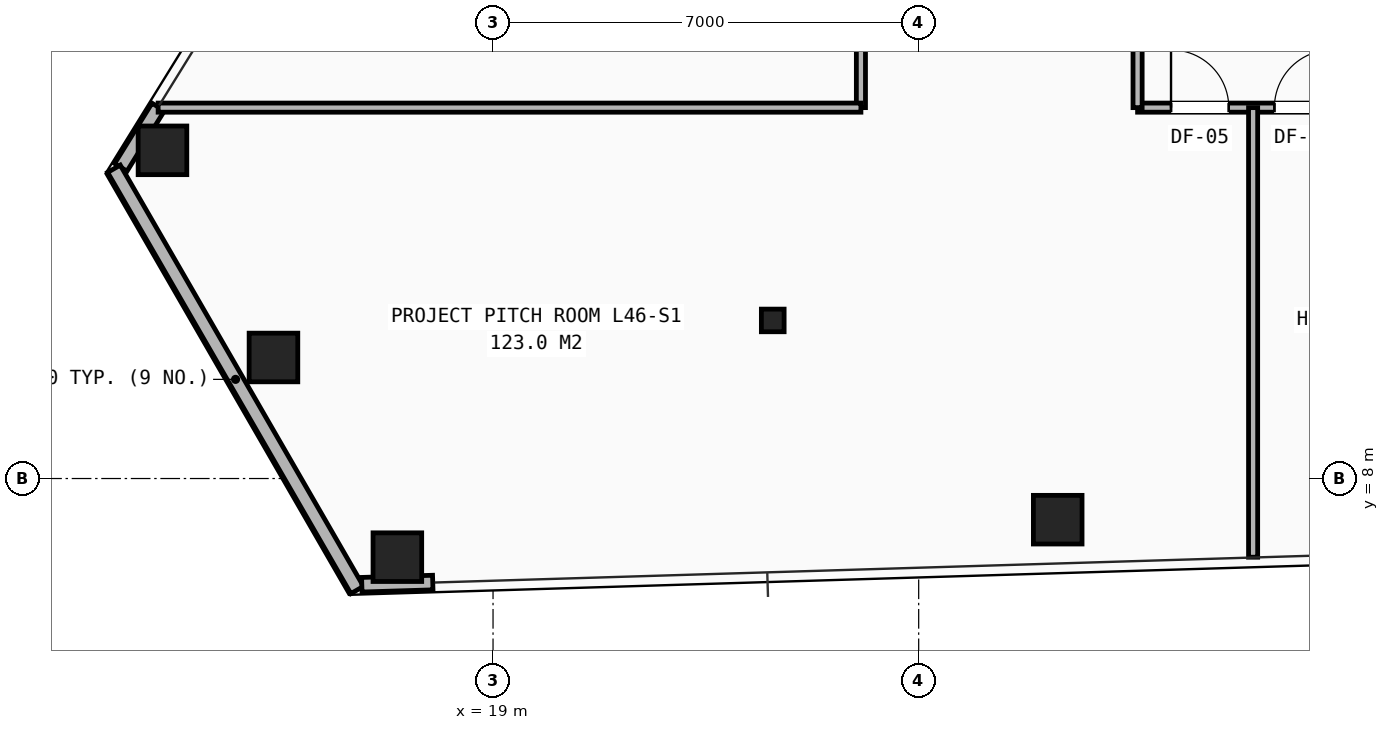
"""IFC4 building model, lengths in metres.
Left out: names, types, materials, properties, quantities, classifications, styles, units other than length and angle.
Written with IfcOpenShell. Run it as: python <this file> out.ifc"""

import sys

from ifc_helpers import new_model, si_unit, direction, frame, frame_2d, origin, origin_2d, place, context, subcontext, project, spatial, rectangle, hollow_rectangle, i_section, extrude, element, fill, save


model = new_model("IFC4")
c1 = context("Model", 3, precision=1e-05, world=origin(), true_north=direction((0.0, 1.0)))
c2 = subcontext(c1, "Body", "Model", "MODEL_VIEW")
j1 = project(units=[si_unit("LENGTHUNIT", "METRE"), si_unit("PLANEANGLEUNIT", "RADIAN")], contexts=[c1])
p1 = place(None, origin())
s1 = spatial("IfcSite", under=j1, at=p1, CompositionType="ELEMENT")
p2 = place(p1, origin())
s2 = spatial("IfcBuilding", under=s1, at=p2, CompositionType="ELEMENT")
p3 = place(p2, frame((0.0, 0.0, 162.0)))
s3 = spatial("IfcBuildingStorey", under=s2, at=p3, CompositionType="ELEMENT", Elevation=162.0)
p4 = place(p3, frame((23.6, 10.6, 0.0), z_axis=(0.0, 0.0, 1.0), x_axis=(1.0, 0.0, 0.0)))
e1 = element("IfcColumn", 1, at=p4, inside=s3, PredefinedType="COLUMN", context=c2, shape_type="SweptSolid", body=[
    extrude(i_section(OverallWidth=0.374, OverallDepth=0.372, WebThickness=0.016, FlangeThickness=0.026, at=origin_2d()), origin(), (0.0, 0.0, 1.0), 3.45),
])
for number, where, z_axis, x_axis in (
    (2, (13.564, 13.398, 0.0), (0.0, 0.0, 1.0), (1.0, 0.0, 0.0)),
    (3, (15.389, 9.991, 0.0), (0.0, 0.0, 1.0), (1.0, 0.0, 0.0)),
    (4, (17.427, 6.707, 0.0), (0.0, 0.0, 1.0), (1.0, 0.0, 0.0)),
    (5, (28.287, 7.323, 0.0), (0.0, 0.0, 1.0), (1.0, 0.0, 0.0)),
):
    element("IfcColumn", number, at=place(p3, frame(where, z_axis=z_axis, x_axis=x_axis)), inside=s3, PredefinedType="COLUMN", context=c2, shape_type="SweptSolid", body=[
        extrude(hollow_rectangle(XDim=0.8, YDim=0.8, WallThickness=0.055, at=origin_2d()), origin(), (0.0, 0.0, 1.0), 3.45),
    ])
p5 = place(p3, frame((13.493, 14.111, 0.0), z_axis=(0.0, 0.0, 1.0), x_axis=(-0.526196207656, -0.850363187731, 0.0)))
e6 = element("IfcWall", 6, at=p5, inside=s3, PredefinedType="SHEAR", context=c2, shape_type="SweptSolid", body=[
    extrude(rectangle(XDim=1.167, YDim=0.24, at=frame_2d((0.583, 0.0))), origin(), (0.0, 0.0, 1.0), 2.583),
])
p6 = place(p3, frame((16.765, 6.167, 0.0), z_axis=(0.0, 0.0, 1.0), x_axis=(-0.499985734379, 0.866033639888, 0.0)))
e7 = element("IfcWall", 7, at=p6, inside=s3, PredefinedType="SHEAR", context=c2, shape_type="SweptSolid", body=[
    extrude(rectangle(XDim=8.0, YDim=0.24, at=frame_2d((4.0, 0.0))), origin(), (0.0, 0.0, 1.0), 2.583),
])
p7 = place(p3, frame((16.842, 6.253, 0.0), z_axis=(0.0, 0.0, 1.0), x_axis=(0.999533860209, 0.030529695312, 0.0)))
e8 = element("IfcWall", 8, at=p7, inside=s3, PredefinedType="SHEAR", context=c2, shape_type="SweptSolid", body=[
    extrude(rectangle(XDim=1.167, YDim=0.24, at=frame_2d((0.584, 0.0))), origin(), (0.0, 0.0, 1.0), 2.583),
])
p8 = place(p3, frame((29.6, 14.1, 0.0), z_axis=(0.0, 0.0, 1.0), x_axis=(1.0, 0.0, 0.0)))
e9 = element("IfcWall", 9, at=p8, inside=s3, PredefinedType="PARTITIONING", context=c2, shape_type="SweptSolid", body=[
    extrude(rectangle(XDim=18.6, YDim=0.15, at=frame_2d((9.3, 0.0))), origin(), (0.0, 0.0, 1.0), 2.252),
])
p9 = place(p8, frame((0.55, 0.0, 0.0)))
e10 = element("IfcOpeningElement", 10, at=p9, cuts=e9, PredefinedType="OPENING", context=c2, shape_type="SweptSolid", body=[
    extrude(rectangle(XDim=0.95, YDim=2.1, at=frame_2d((0.475, 1.05))), frame((0.0, 0.085, 0.0), z_axis=(0.0, -1.0, 0.0), x_axis=(1.0, 0.0, 0.0)), (0.0, 0.0, 1.0), 0.17),
])
p10 = place(p8, frame((2.25, 0.0, 0.0)))
e11 = element("IfcOpeningElement", 11, at=p10, cuts=e9, PredefinedType="OPENING", context=c2, shape_type="SweptSolid", body=[
    extrude(rectangle(XDim=0.95, YDim=2.1, at=frame_2d((0.475, 1.05))), frame((0.0, 0.085, 0.0), z_axis=(0.0, -1.0, 0.0), x_axis=(1.0, 0.0, 0.0)), (0.0, 0.0, 1.0), 0.17),
])
p11 = place(p8, frame((6.55, 0.0, 0.0)))
e12 = element("IfcOpeningElement", 12, at=p11, cuts=e9, PredefinedType="OPENING", context=c2, shape_type="SweptSolid", body=[
    extrude(rectangle(XDim=0.95, YDim=2.1, at=frame_2d((0.475, 1.05))), frame((0.0, 0.085, 0.0), z_axis=(0.0, -1.0, 0.0), x_axis=(1.0, 0.0, 0.0)), (0.0, 0.0, 1.0), 0.17),
])
p12 = place(p8, frame((10.75, 0.0, 0.0)))
e13 = element("IfcOpeningElement", 13, at=p12, cuts=e9, PredefinedType="OPENING", context=c2, shape_type="SweptSolid", body=[
    extrude(rectangle(XDim=0.95, YDim=2.1, at=frame_2d((0.475, 1.05))), frame((0.0, 0.085, 0.0), z_axis=(0.0, -1.0, 0.0), x_axis=(1.0, 0.0, 0.0)), (0.0, 0.0, 1.0), 0.17),
])
p13 = place(p8, frame((14.95, 0.0, 0.0)))
e14 = element("IfcOpeningElement", 14, at=p13, cuts=e9, PredefinedType="OPENING", context=c2, shape_type="SweptSolid", body=[
    extrude(rectangle(XDim=0.95, YDim=2.1, at=frame_2d((0.475, 1.05))), frame((0.0, 0.085, 0.0), z_axis=(0.0, -1.0, 0.0), x_axis=(1.0, 0.0, 0.0)), (0.0, 0.0, 1.0), 0.17),
])
p14 = place(p3, frame((29.6, 14.1, 0.0), z_axis=(0.0, 0.0, 1.0), x_axis=(0.0, 1.0, 0.0)))
e15 = element("IfcWall", 15, at=p14, inside=s3, PredefinedType="PARTITIONING", context=c2, shape_type="SweptSolid", body=[
    extrude(rectangle(XDim=8.7, YDim=0.15, at=frame_2d((4.35, 0.0))), origin(), (0.0, 0.0, 1.0), 3.21),
])
p15 = place(p14, frame((2.65, 0.0, 0.0)))
e16 = element("IfcOpeningElement", 16, at=p15, cuts=e15, PredefinedType="OPENING", context=c2, shape_type="SweptSolid", body=[
    extrude(rectangle(XDim=0.85, YDim=2.05, at=frame_2d((0.425, 1.025))), frame((0.0, 0.085, 0.0), z_axis=(0.0, -1.0, 0.0), x_axis=(1.0, 0.0, 0.0)), (0.0, 0.0, 1.0), 0.17),
])
p16 = place(p14, frame((4.75, 0.0, 0.0)))
e17 = element("IfcOpeningElement", 17, at=p16, cuts=e15, PredefinedType="OPENING", context=c2, shape_type="SweptSolid", body=[
    extrude(rectangle(XDim=0.85, YDim=2.05, at=frame_2d((0.425, 1.025))), frame((0.0, 0.085, 0.0), z_axis=(0.0, -1.0, 0.0), x_axis=(1.0, 0.0, 0.0)), (0.0, 0.0, 1.0), 0.17),
])
p17 = place(p14, frame((6.85, 0.0, 0.0)))
e18 = element("IfcOpeningElement", 18, at=p17, cuts=e15, PredefinedType="OPENING", context=c2, shape_type="SweptSolid", body=[
    extrude(rectangle(XDim=0.85, YDim=2.05, at=frame_2d((0.425, 1.025))), frame((0.0, 0.085, 0.0), z_axis=(0.0, -1.0, 0.0), x_axis=(1.0, 0.0, 0.0)), (0.0, 0.0, 1.0), 0.17),
])
p18 = place(p3, frame((25.05, 14.1, 0.0), z_axis=(0.0, 0.0, 1.0), x_axis=(0.0, 1.0, 0.0)))
e19 = element("IfcWall", 19, at=p18, inside=s3, PredefinedType="PARTITIONING", context=c2, shape_type="SweptSolid", body=[
    extrude(rectangle(XDim=8.7, YDim=0.15, at=frame_2d((4.35, 0.0))), origin(), (0.0, 0.0, 1.0), 3.21),
])
p19 = place(p3, frame((31.5, 6.706, 0.0), z_axis=(0.0, 0.0, 1.0), x_axis=(0.0, 1.0, 0.0)))
e20 = element("IfcWall", 20, at=p19, inside=s3, PredefinedType="PARTITIONING", context=c2, shape_type="SweptSolid", body=[
    extrude(rectangle(XDim=7.394, YDim=0.15, at=frame_2d((3.697, 0.0))), origin(), (0.0, 0.0, 1.0), 2.589),
])
p20 = place(p3, frame((13.492, 14.1, 0.0), z_axis=(0.0, 0.0, 1.0), x_axis=(1.0, 0.0, 0.0)))
e21 = element("IfcWall", 21, at=p20, inside=s3, PredefinedType="PARTITIONING", context=c2, shape_type="SweptSolid", body=[
    extrude(rectangle(XDim=11.558, YDim=0.15, at=frame_2d((5.779, 0.0))), origin(), (0.0, 0.0, 1.0), 2.589),
])
p21 = place(p9, origin())
e22 = element("IfcDoor", 22, at=p21, inside=s3, OperationType="SINGLE_SWING_LEFT", PredefinedType="DOOR", context=c2, shape_type="SweptSolid", body=[
    extrude(rectangle(XDim=0.95, YDim=2.1, at=frame_2d((0.475, 1.05))), frame((0.0, 0.025, 0.0), z_axis=(0.0, -1.0, 0.0), x_axis=(1.0, 0.0, 0.0)), (0.0, 0.0, 1.0), 0.05),
])
fill(e10, e22)
p22 = place(p10, origin())
e23 = element("IfcDoor", 23, at=p22, inside=s3, OperationType="SINGLE_SWING_RIGHT", PredefinedType="DOOR", context=c2, shape_type="SweptSolid", body=[
    extrude(rectangle(XDim=0.95, YDim=2.1, at=frame_2d((0.475, 1.05))), frame((0.0, 0.025, 0.0), z_axis=(0.0, -1.0, 0.0), x_axis=(1.0, 0.0, 0.0)), (0.0, 0.0, 1.0), 0.05),
])
fill(e11, e23)
save(model, sys.argv[1])
